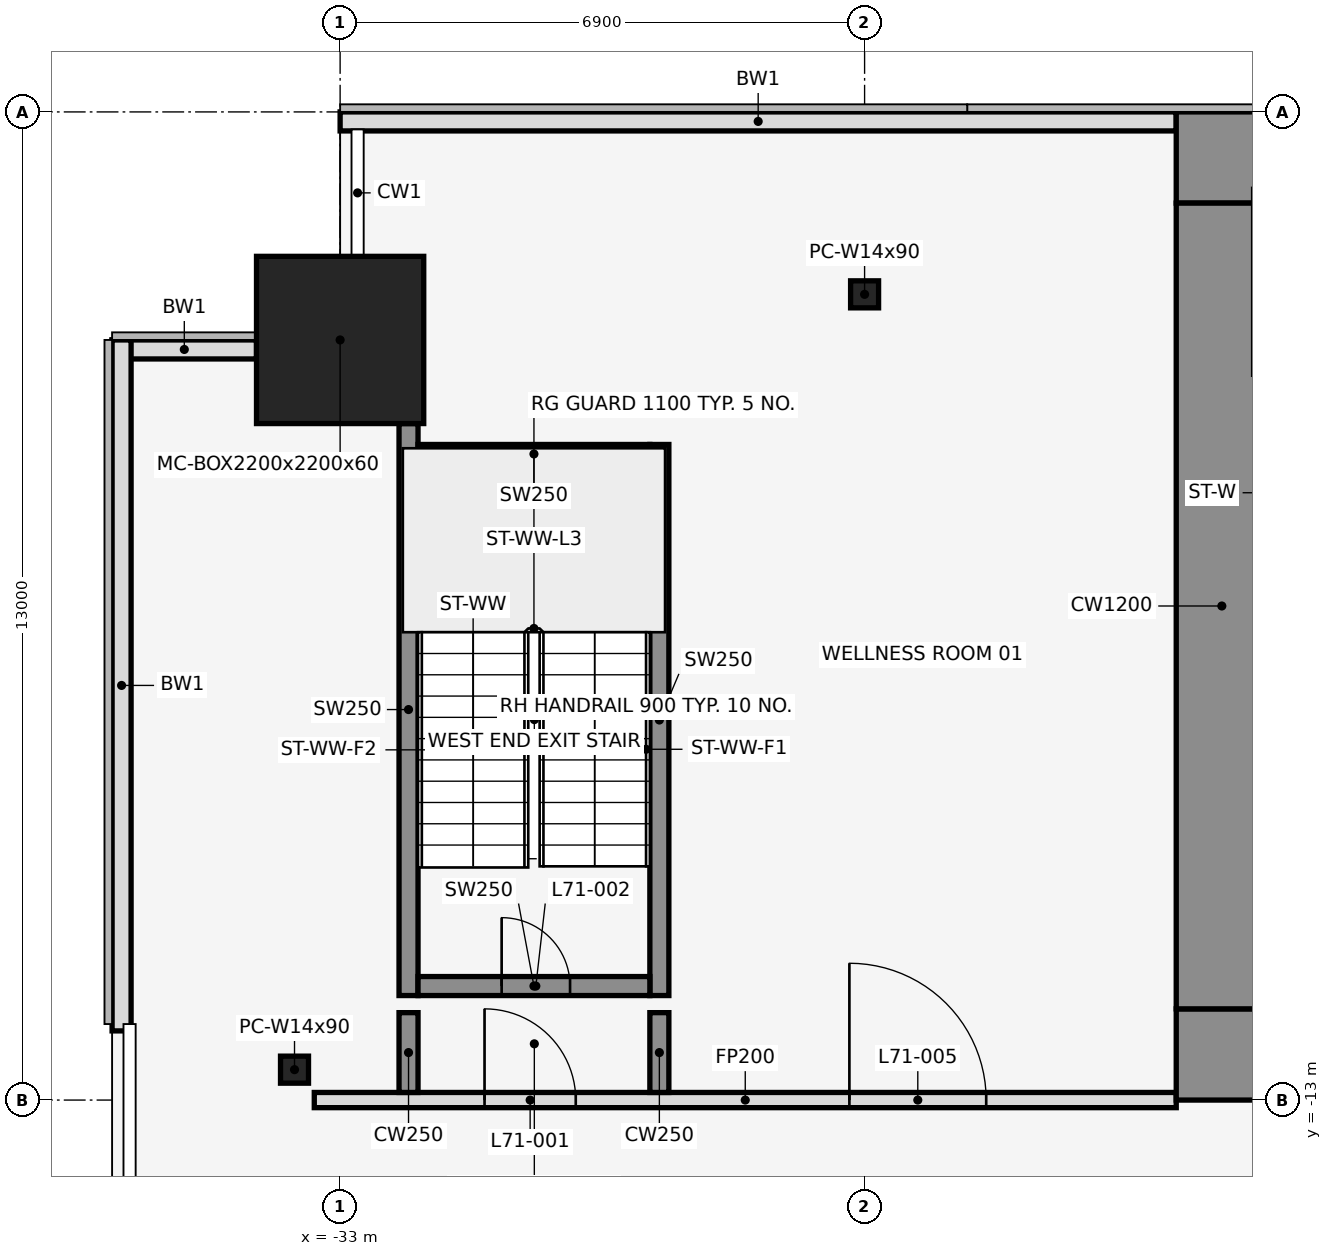
"""IFC4 building model, lengths in metres.
Left out: names, types, materials, properties, quantities, classifications, styles, units other than length and angle.
Written with IfcOpenShell. Run it as: python <this file> out.ifc"""

import sys

from ifc_helpers import new_model, si_unit, direction, frame, frame_2d, origin, origin_2d, place, context, subcontext, project, spatial, rectangle, hollow_rectangle, i_section, extrude, element, fill, save


model = new_model("IFC4")
c1 = context("Model", 3, precision=1e-05, world=origin(), true_north=direction((0.0, 1.0)))
c2 = subcontext(c1, "Body", "Model", "MODEL_VIEW")
j1 = project(units=[si_unit("LENGTHUNIT", "METRE"), si_unit("PLANEANGLEUNIT", "RADIAN")], contexts=[c1])
p1 = place(None, origin())
s1 = spatial("IfcSite", under=j1, at=p1, CompositionType="ELEMENT")
p2 = place(p1, origin())
s2 = spatial("IfcBuilding", under=s1, at=p2, CompositionType="ELEMENT")
p3 = place(p2, frame((0.0, 0.0, 315.5)))
s3 = spatial("IfcBuildingStorey", under=s2, at=p3, CompositionType="ELEMENT", Elevation=315.5)
p4 = place(p3, frame((-33.0, -3.0, 0.0), z_axis=(0.0, 0.0, 1.0), x_axis=(1.0, 0.0, 0.0)))
e1 = element("IfcColumn", 1, at=p4, inside=s3, PredefinedType="COLUMN", context=c2, shape_type="SweptSolid", body=[
    extrude(hollow_rectangle(XDim=2.2, YDim=2.2, WallThickness=0.06, at=origin_2d()), origin(), (0.0, 0.0, 1.0), 4.5),
])
for number, where, z_axis, x_axis in (
    (2, (-26.1, -2.4, 0.0), (0.0, 0.0, 1.0), (1.0, 0.0, 0.0)),
    (3, (-33.6, -12.6, 0.0), (0.0, 0.0, 1.0), (1.0, 0.0, 0.0)),
):
    element("IfcColumn", number, at=place(p3, frame(where, z_axis=z_axis, x_axis=x_axis)), inside=s3, PredefinedType="COLUMN", context=c2, shape_type="SweptSolid", body=[
        extrude(i_section(OverallWidth=0.368, OverallDepth=0.356, WebThickness=0.011, FlangeThickness=0.018, at=origin_2d()), origin(), (0.0, 0.0, 1.0), 4.5),
    ])
p5 = place(p3, frame((-22.0, -0.125, 0.0), z_axis=(0.0, 0.0, 1.0), x_axis=(-1.0, 0.0, 0.0)))
e4 = element("IfcWall", 4, at=p5, inside=s3, PredefinedType="STANDARD", context=c2, shape_type="SweptSolid", body=[
    extrude(rectangle(XDim=11.0, YDim=0.25, at=frame_2d((5.5, 0.0))), origin(), (0.0, 0.0, 1.0), 4.35),
])
p6 = place(p3, frame((-34.1, -3.125, 0.0), z_axis=(0.0, 0.0, 1.0), x_axis=(-1.0, 0.0, 0.0)))
e5 = element("IfcWall", 5, at=p6, inside=s3, PredefinedType="STANDARD", context=c2, shape_type="SweptSolid", body=[
    extrude(rectangle(XDim=1.9, YDim=0.25, at=frame_2d((0.95, 0.0))), origin(), (0.0, 0.0, 1.0), 4.35),
])
p7 = place(p3, frame((-35.875, -3.0, 0.0), z_axis=(0.0, 0.0, 1.0), x_axis=(0.0, -1.0, 0.0)))
e6 = element("IfcWall", 6, at=p7, inside=s3, PredefinedType="STANDARD", context=c2, shape_type="SweptSolid", body=[
    extrude(rectangle(XDim=9.09, YDim=0.25, at=frame_2d((4.545, 0.0))), origin(), (0.0, 0.0, 1.0), 4.35),
])
p8 = place(p3, frame((-32.1, -11.625, 0.0), z_axis=(0.0, 0.0, 1.0), x_axis=(0.0, 1.0, 0.0)))
e7 = element("IfcWall", 7, at=p8, inside=s3, PredefinedType="SHEAR", context=c2, shape_type="SweptSolid", body=[
    extrude(rectangle(XDim=7.525, YDim=0.25, at=frame_2d((3.762, 0.0))), origin(), (0.0, 0.0, 1.0), 4.5),
])
p9 = place(p3, frame((-28.8, -11.625, 0.0), z_axis=(0.0, 0.0, 1.0), x_axis=(0.0, 1.0, 0.0)))
e8 = element("IfcWall", 8, at=p9, inside=s3, PredefinedType="SHEAR", context=c2, shape_type="SweptSolid", body=[
    extrude(rectangle(XDim=7.25, YDim=0.25, at=frame_2d((3.625, 0.0))), origin(), (0.0, 0.0, 1.0), 4.5),
])
p10 = place(p3, frame((-31.975, -11.5, 0.0), z_axis=(0.0, 0.0, 1.0), x_axis=(1.0, 0.0, 0.0)))
e9 = element("IfcWall", 9, at=p10, inside=s3, PredefinedType="SHEAR", context=c2, shape_type="SweptSolid", body=[
    extrude(rectangle(XDim=3.05, YDim=0.25, at=frame_2d((1.525, 0.0))), origin(), (0.0, 0.0, 1.0), 4.5),
])
p11 = place(p10, frame((1.1, 0.0, 0.0)))
e10 = element("IfcOpeningElement", 10, at=p11, cuts=e9, PredefinedType="OPENING", context=c2, shape_type="SweptSolid", body=[
    extrude(rectangle(XDim=0.9, YDim=2.1, at=frame_2d((0.45, 1.05))), frame((0.0, 0.137, 0.0), z_axis=(0.0, -1.0, 0.0), x_axis=(1.0, 0.0, 0.0)), (0.0, 0.0, 1.0), 0.274),
])
p12 = place(p3, frame((-31.975, -4.5, 0.0), z_axis=(0.0, 0.0, 1.0), x_axis=(1.0, 0.0, 0.0)))
e11 = element("IfcWall", 11, at=p12, inside=s3, PredefinedType="SHEAR", context=c2, shape_type="SweptSolid", body=[
    extrude(rectangle(XDim=3.05, YDim=0.25, at=frame_2d((1.525, 0.0))), origin(), (0.0, 0.0, 1.0), 4.5),
])
p13 = place(p3, frame((-33.34, -13.0, 0.0), z_axis=(0.0, 0.0, 1.0), x_axis=(1.0, 0.0, 0.0)))
e12 = element("IfcWall", 12, at=p13, inside=s3, PredefinedType="PARTITIONING", context=c2, shape_type="SweptSolid", body=[
    extrude(rectangle(XDim=11.34, YDim=0.2, at=frame_2d((5.67, 0.0))), origin(), (0.0, 0.0, 1.0), 3.418),
])
p14 = place(p13, frame((2.24, 0.0, 0.0)))
e13 = element("IfcOpeningElement", 13, at=p14, cuts=e12, PredefinedType="OPENING", context=c2, shape_type="SweptSolid", body=[
    extrude(rectangle(XDim=1.2, YDim=2.1, at=frame_2d((0.6, 1.05))), frame((0.0, 0.112, 0.0), z_axis=(0.0, -1.0, 0.0), x_axis=(1.0, 0.0, 0.0)), (0.0, 0.0, 1.0), 0.224),
])
p15 = place(p13, frame((7.04, 0.0, 0.0)))
e14 = element("IfcOpeningElement", 14, at=p15, cuts=e12, PredefinedType="OPENING", context=c2, shape_type="SweptSolid", body=[
    extrude(rectangle(XDim=1.8, YDim=2.1, at=frame_2d((0.9, 1.05))), frame((0.0, 0.112, 0.0), z_axis=(0.0, -1.0, 0.0), x_axis=(1.0, 0.0, 0.0)), (0.0, 0.0, 1.0), 0.224),
])
for number, where, z_axis, x_axis in (
    (15, (-32.1, -12.9, 0.0), (0.0, 0.0, 1.0), (0.0, 1.0, 0.0)),
    (16, (-28.8, -12.9, 0.0), (0.0, 0.0, 1.0), (0.0, 1.0, 0.0)),
):
    element("IfcWall", number, at=place(p3, frame(where, z_axis=z_axis, x_axis=x_axis)), inside=s3, PredefinedType="SHEAR", context=c2, shape_type="SweptSolid", body=[
        extrude(rectangle(XDim=1.05, YDim=0.25, at=frame_2d((0.525, 0.0))), origin(), (0.0, 0.0, 1.0), 4.5),
    ])
p16 = place(p3, frame((-22.0, -0.6, 0.0), z_axis=(0.0, 0.0, 1.0), x_axis=(1.0, 0.0, 0.0)))
e17 = element("IfcWall", 17, at=p16, inside=s3, PredefinedType="SHEAR", context=c2, shape_type="SweptSolid", body=[
    extrude(rectangle(XDim=44.0, YDim=1.2, at=frame_2d((22.0, 0.0))), origin(), (0.0, 0.0, 1.0), 4.5),
])
p17 = place(p16, frame((18.55, 0.0, 0.0)))
e18 = element("IfcOpeningElement", 18, at=p17, cuts=e17, PredefinedType="OPENING", context=c2, shape_type="SweptSolid", body=[
    extrude(rectangle(XDim=0.9, YDim=2.1, at=frame_2d((0.45, 1.05))), frame((0.0, 0.612, 0.0), z_axis=(0.0, -1.0, 0.0), x_axis=(1.0, 0.0, 0.0)), (0.0, 0.0, 1.0), 1.224),
])
p18 = place(p16, frame((24.55, 0.0, 0.0)))
e19 = element("IfcOpeningElement", 19, at=p18, cuts=e17, PredefinedType="OPENING", context=c2, shape_type="SweptSolid", body=[
    extrude(rectangle(XDim=0.9, YDim=2.1, at=frame_2d((0.45, 1.05))), frame((0.0, 0.612, 0.0), z_axis=(0.0, -1.0, 0.0), x_axis=(1.0, 0.0, 0.0)), (0.0, 0.0, 1.0), 1.224),
])
p19 = place(p3, frame((-22.0, -12.4, 0.0), z_axis=(0.0, 0.0, 1.0), x_axis=(1.0, 0.0, 0.0)))
e20 = element("IfcWall", 20, at=p19, inside=s3, PredefinedType="SHEAR", context=c2, shape_type="SweptSolid", body=[
    extrude(rectangle(XDim=44.0, YDim=1.2, at=frame_2d((22.0, 0.0))), origin(), (0.0, 0.0, 1.0), 4.5),
])
p20 = place(p19, frame((2.2, 0.0, 0.0)))
e21 = element("IfcOpeningElement", 21, at=p20, cuts=e20, PredefinedType="OPENING", context=c2, shape_type="SweptSolid", body=[
    extrude(rectangle(XDim=1.2, YDim=2.1, at=frame_2d((0.6, 1.05))), frame((0.0, 0.612, 0.0), z_axis=(0.0, -1.0, 0.0), x_axis=(1.0, 0.0, 0.0)), (0.0, 0.0, 1.0), 1.224),
])
p21 = place(p19, frame((21.4, 0.0, 0.0)))
e22 = element("IfcOpeningElement", 22, at=p21, cuts=e20, PredefinedType="OPENING", context=c2, shape_type="SweptSolid", body=[
    extrude(rectangle(XDim=1.2, YDim=2.1, at=frame_2d((0.6, 1.05))), frame((0.0, 0.612, 0.0), z_axis=(0.0, -1.0, 0.0), x_axis=(1.0, 0.0, 0.0)), (0.0, 0.0, 1.0), 1.224),
])
p22 = place(p19, frame((40.6, 0.0, 0.0)))
e23 = element("IfcOpeningElement", 23, at=p22, cuts=e20, PredefinedType="OPENING", context=c2, shape_type="SweptSolid", body=[
    extrude(rectangle(XDim=1.2, YDim=2.1, at=frame_2d((0.6, 1.05))), frame((0.0, 0.612, 0.0), z_axis=(0.0, -1.0, 0.0), x_axis=(1.0, 0.0, 0.0)), (0.0, 0.0, 1.0), 1.224),
])
p23 = place(p19, frame((16.0, 0.0, 0.0)))
e24 = element("IfcOpeningElement", 24, at=p23, cuts=e20, PredefinedType="OPENING", context=c2, shape_type="SweptSolid", body=[
    extrude(rectangle(XDim=1.8, YDim=2.1, at=frame_2d((0.9, 1.05))), frame((0.0, 0.612, 0.0), z_axis=(0.0, -1.0, 0.0), x_axis=(1.0, 0.0, 0.0)), (0.0, 0.0, 1.0), 1.224),
])
p24 = place(p19, frame((6.3, 0.0, 0.0)))
e25 = element("IfcOpeningElement", 25, at=p24, cuts=e20, PredefinedType="OPENING", context=c2, shape_type="SweptSolid", body=[
    extrude(rectangle(XDim=1.2, YDim=2.1, at=frame_2d((0.6, 1.05))), frame((0.0, 0.612, 0.0), z_axis=(0.0, -1.0, 0.0), x_axis=(1.0, 0.0, 0.0)), (0.0, 0.0, 1.0), 1.224),
])
p25 = place(p19, frame((26.2, 0.0, 0.0)))
e26 = element("IfcOpeningElement", 26, at=p25, cuts=e20, PredefinedType="OPENING", context=c2, shape_type="SweptSolid", body=[
    extrude(rectangle(XDim=1.8, YDim=2.1, at=frame_2d((0.9, 1.05))), frame((0.0, 0.612, 0.0), z_axis=(0.0, -1.0, 0.0), x_axis=(1.0, 0.0, 0.0)), (0.0, 0.0, 1.0), 1.224),
])
p26 = place(p19, frame((36.5, 0.0, 0.0)))
e27 = element("IfcOpeningElement", 27, at=p26, cuts=e20, PredefinedType="OPENING", context=c2, shape_type="SweptSolid", body=[
    extrude(rectangle(XDim=1.2, YDim=2.1, at=frame_2d((0.6, 1.05))), frame((0.0, 0.612, 0.0), z_axis=(0.0, -1.0, 0.0), x_axis=(1.0, 0.0, 0.0)), (0.0, 0.0, 1.0), 1.224),
])
p27 = place(p3, frame((-21.4, -11.8, 0.0), z_axis=(0.0, 0.0, 1.0), x_axis=(0.0, 1.0, 0.0)))
e28 = element("IfcWall", 28, at=p27, inside=s3, PredefinedType="SHEAR", context=c2, shape_type="SweptSolid", body=[
    extrude(rectangle(XDim=10.6, YDim=1.2, at=frame_2d((5.3, 0.0))), origin(), (0.0, 0.0, 1.0), 4.5),
])
p28 = place(p14, origin())
e29 = element("IfcDoor", 29, at=p28, inside=s3, OperationType="SINGLE_SWING_LEFT", PredefinedType="DOOR", context=c2, shape_type="SweptSolid", body=[
    extrude(rectangle(XDim=1.2, YDim=2.1, at=frame_2d((0.6, 1.05))), frame((0.0, 0.025, 0.0), z_axis=(0.0, -1.0, 0.0), x_axis=(1.0, 0.0, 0.0)), (0.0, 0.0, 1.0), 0.05),
])
fill(e13, e29)
p29 = place(p11, origin())
e30 = element("IfcDoor", 30, at=p29, inside=s3, OperationType="SINGLE_SWING_LEFT", PredefinedType="DOOR", context=c2, shape_type="SweptSolid", body=[
    extrude(rectangle(XDim=0.9, YDim=2.1, at=frame_2d((0.45, 1.05))), frame((0.0, 0.025, 0.0), z_axis=(0.0, -1.0, 0.0), x_axis=(1.0, 0.0, 0.0)), (0.0, 0.0, 1.0), 0.05),
])
fill(e10, e30)
p30 = place(p15, origin())
e31 = element("IfcDoor", 31, at=p30, inside=s3, OperationType="SINGLE_SWING_LEFT", PredefinedType="DOOR", context=c2, shape_type="SweptSolid", body=[
    extrude(rectangle(XDim=1.8, YDim=2.1, at=frame_2d((0.9, 1.05))), frame((0.0, 0.025, 0.0), z_axis=(0.0, -1.0, 0.0), x_axis=(1.0, 0.0, 0.0)), (0.0, 0.0, 1.0), 0.05),
])
fill(e14, e31)
save(model, sys.argv[1])
